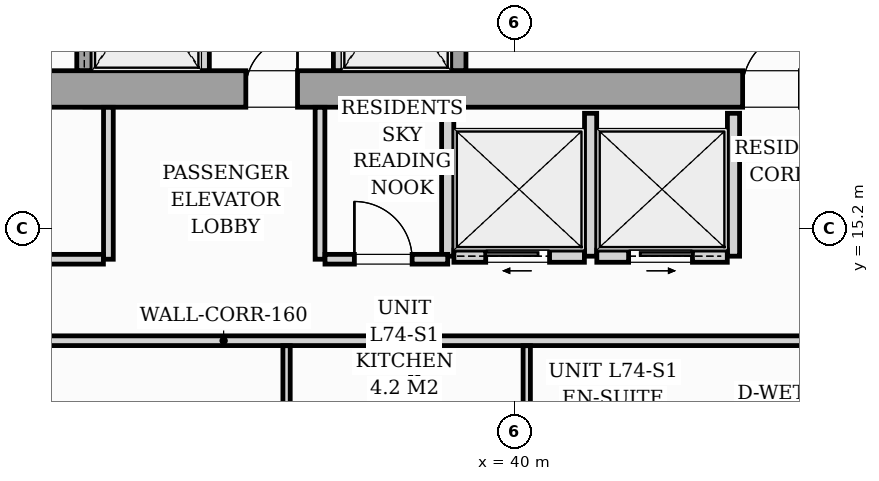
"""IFC4 building model, lengths in metres.
Left out: names, types, materials, properties, quantities, classifications, styles, units other than length and angle.
Written with IfcOpenShell. Run it as: python <this file> out.ifc"""

import sys

from ifc_helpers import new_model, si_unit, direction, frame, frame_2d, origin, origin_2d, place, context, subcontext, project, spatial, rectangle, i_section, extrude, source, transform, mapped, element, fill, save


model = new_model("IFC4")
c1 = context("Model", 3, precision=1e-05, world=origin(), true_north=direction((0.0, 1.0)))
c2 = subcontext(c1, "Body", "Model", "MODEL_VIEW")
j1 = project(units=[si_unit("LENGTHUNIT", "METRE"), si_unit("PLANEANGLEUNIT", "RADIAN")], contexts=[c1])
p1 = place(None, origin())
s1 = spatial("IfcSite", under=j1, at=p1, CompositionType="ELEMENT")
p2 = place(p1, origin())
s2 = spatial("IfcBuilding", under=s1, at=p2, CompositionType="ELEMENT")
p3 = place(p2, frame((0.0, 0.0, 256.2)))
s3 = spatial("IfcBuildingStorey", under=s2, at=p3, CompositionType="ELEMENT", Elevation=256.2)
m1 = source(origin(), c2, "Body", "SweptSolid", [
    extrude(i_section(OverallWidth=0.409, OverallDepth=0.425, WebThickness=0.033, FlangeThickness=0.052, FilletRadius=0.018, at=origin_2d()), origin(), (0.0, 0.0, 1.0), 3.296),
])
for number, where, z_axis, x_axis in (
    (1, (33.12, 17.4, 0.002), (0.0, 0.0, 1.0), (1.0, 0.0, 0.0)),
    (2, (38.88, 17.4, 0.002), (0.0, 0.0, 1.0), (1.0, 0.0, 0.0)),
):
    element("IfcColumn", number, at=place(p3, frame(where, z_axis=z_axis, x_axis=x_axis)), inside=s3, PredefinedType="PILASTER", context=c2, shape_type="MappedRepresentation", body=[
        mapped(m1, transform((0.0, 0.0, 0.0), scale=1.0)),
    ])
p4 = place(p3, frame((26.2, 17.5, 0.0), z_axis=(0.0, 0.0, 1.0), x_axis=(1.0, 0.0, 0.0)))
e3 = element("IfcWall", 3, at=p4, inside=s3, PredefinedType="SHEAR", context=c2, shape_type="SweptSolid", body=[
    extrude(rectangle(XDim=19.6, YDim=0.6, at=frame_2d((9.8, 0.0))), origin(), (0.0, 0.0, 1.0), 3.3),
])
p5 = place(p4, frame((0.95, 0.0, 0.0)))
e4 = element("IfcOpeningElement", 4, at=p5, cuts=e3, PredefinedType="OPENING", context=c2, shape_type="SweptSolid", body=[
    extrude(rectangle(XDim=0.95, YDim=2.06, at=frame_2d((0.475, 1.03))), frame((0.0, 0.31, 0.0), z_axis=(0.0, -1.0, 0.0), x_axis=(1.0, 0.0, 0.0)), (0.0, 0.0, 1.0), 0.62),
])
p6 = place(p4, frame((9.38, 0.0, 0.0)))
e5 = element("IfcOpeningElement", 5, at=p6, cuts=e3, PredefinedType="OPENING", context=c2, shape_type="SweptSolid", body=[
    extrude(rectangle(XDim=0.85, YDim=2.0, at=frame_2d((0.425, 1.0))), frame((0.0, 0.31, 0.0), z_axis=(0.0, -1.0, 0.0), x_axis=(1.0, 0.0, 0.0)), (0.0, 0.0, 1.0), 0.62),
])
p7 = place(p4, frame((17.55, 0.0, 0.0)))
e6 = element("IfcOpeningElement", 6, at=p7, cuts=e3, PredefinedType="OPENING", context=c2, shape_type="SweptSolid", body=[
    extrude(rectangle(XDim=0.95, YDim=2.06, at=frame_2d((0.475, 1.03))), frame((0.0, 0.31, 0.0), z_axis=(0.0, -1.0, 0.0), x_axis=(1.0, 0.0, 0.0)), (0.0, 0.0, 1.0), 0.62),
])
p8 = place(p3, frame((32.925, 17.802, 0.0), z_axis=(0.0, 0.0, 1.0), x_axis=(0.0, 1.0, 0.0)))
e7 = element("IfcWall", 7, at=p8, inside=s3, PredefinedType="SOLIDWALL", context=c2, shape_type="SweptSolid", body=[
    extrude(rectangle(XDim=2.646, YDim=0.25, at=frame_2d((1.323, 0.0))), origin(), (0.0, 0.0, 1.0), 3.3),
])
p9 = place(p8, frame((0.548, 0.0, 0.0)))
e8 = element("IfcOpeningElement", 8, at=p9, cuts=e7, PredefinedType="OPENING", context=c2, shape_type="SweptSolid", body=[
    extrude(rectangle(XDim=1.1, YDim=2.08, at=frame_2d((0.55, 1.04))), frame((0.0, 0.135, 0.0), z_axis=(0.0, -1.0, 0.0), x_axis=(1.0, 0.0, 0.0)), (0.0, 0.0, 1.0), 0.27),
])
for number, where, z_axis, x_axis in (
    (9, (34.9, 17.802, 0.0), (0.0, 0.0, 1.0), (0.0, 1.0, 0.0)),
    (10, (37.1, 17.802, 0.0), (0.0, 0.0, 1.0), (0.0, 1.0, 0.0)),
):
    element("IfcWall", number, at=place(p3, frame(where, z_axis=z_axis, x_axis=x_axis)), inside=s3, PredefinedType="PARTITIONING", context=c2, shape_type="SweptSolid", body=[
        extrude(rectangle(XDim=2.646, YDim=0.16, at=frame_2d((1.323, 0.0))), origin(), (0.0, 0.0, 1.0), 3.0),
    ])
p10 = place(p3, frame((39.075, 17.802, 0.0), z_axis=(0.0, 0.0, 1.0), x_axis=(0.0, 1.0, 0.0)))
e11 = element("IfcWall", 11, at=p10, inside=s3, PredefinedType="SOLIDWALL", context=c2, shape_type="SweptSolid", body=[
    extrude(rectangle(XDim=2.646, YDim=0.25, at=frame_2d((1.323, 0.0))), origin(), (0.0, 0.0, 1.0), 3.3),
])
p11 = place(p10, frame((0.548, 0.0, 0.0)))
e12 = element("IfcOpeningElement", 12, at=p11, cuts=e11, PredefinedType="OPENING", context=c2, shape_type="SweptSolid", body=[
    extrude(rectangle(XDim=1.1, YDim=2.08, at=frame_2d((0.55, 1.04))), frame((0.0, 0.135, 0.0), z_axis=(0.0, -1.0, 0.0), x_axis=(1.0, 0.0, 0.0)), (0.0, 0.0, 1.0), 0.27),
])
for number, where, z_axis, x_axis in (
    (13, (38.9, 14.75, 0.0), (0.0, 0.0, 1.0), (0.0, 1.0, 0.0)),
    (14, (41.25, 14.75, 0.0), (0.0, 0.0, 1.0), (0.0, 1.0, 0.0)),
    (15, (43.6, 14.75, 0.0), (0.0, 0.0, 1.0), (0.0, 1.0, 0.0)),
):
    element("IfcWall", number, at=place(p3, frame(where, z_axis=z_axis, x_axis=x_axis)), inside=s3, PredefinedType="PARTITIONING", context=c2, shape_type="SweptSolid", body=[
        extrude(rectangle(XDim=2.35, YDim=0.2, at=frame_2d((1.175, 0.0))), origin(), (0.0, 0.0, 1.0), 3.0),
    ])
p12 = place(p3, frame((39.002, 14.75, 0.0), z_axis=(0.0, 0.0, 1.0), x_axis=(1.0, 0.0, 0.0)))
e16 = element("IfcWall", 16, at=p12, inside=s3, PredefinedType="PARTITIONING", context=c2, shape_type="SweptSolid", body=[
    extrude(rectangle(XDim=2.146, YDim=0.2, at=frame_2d((1.073, 0.0))), origin(), (0.0, 0.0, 1.0), 3.0),
])
p13 = place(p12, frame((0.523, 0.0, 0.0)))
e17 = element("IfcOpeningElement", 17, at=p13, cuts=e16, PredefinedType="OPENING", context=c2, shape_type="SweptSolid", body=[
    extrude(rectangle(XDim=1.05, YDim=2.08, at=frame_2d((0.525, 1.04))), frame((0.0, 0.11, 0.0), z_axis=(0.0, -1.0, 0.0), x_axis=(1.0, 0.0, 0.0)), (0.0, 0.0, 1.0), 0.22),
])
p14 = place(p3, frame((41.352, 14.75, 0.0), z_axis=(0.0, 0.0, 1.0), x_axis=(1.0, 0.0, 0.0)))
e18 = element("IfcWall", 18, at=p14, inside=s3, PredefinedType="PARTITIONING", context=c2, shape_type="SweptSolid", body=[
    extrude(rectangle(XDim=2.146, YDim=0.2, at=frame_2d((1.073, 0.0))), origin(), (0.0, 0.0, 1.0), 3.0),
])
p15 = place(p14, frame((0.523, 0.0, 0.0)))
e19 = element("IfcOpeningElement", 19, at=p15, cuts=e18, PredefinedType="OPENING", context=c2, shape_type="SweptSolid", body=[
    extrude(rectangle(XDim=1.05, YDim=2.08, at=frame_2d((0.525, 1.04))), frame((0.0, 0.11, 0.0), z_axis=(0.0, -1.0, 0.0), x_axis=(1.0, 0.0, 0.0)), (0.0, 0.0, 1.0), 0.22),
])
p16 = place(p3, frame((24.55, 13.36, 0.0), z_axis=(0.0, 0.0, 1.0), x_axis=(1.0, 0.0, 0.0)))
e20 = element("IfcWall", 20, at=p16, inside=s3, PredefinedType="PARTITIONING", context=c2, shape_type="SweptSolid", body=[
    extrude(rectangle(XDim=21.33, YDim=0.16, at=frame_2d((10.665, 0.0))), origin(), (0.0, 0.0, 1.0), 2.51),
])
p17 = place(p16, frame((5.415, 0.0, 0.0)))
e21 = element("IfcOpeningElement", 21, at=p17, cuts=e20, PredefinedType="OPENING", context=c2, shape_type="SweptSolid", body=[
    extrude(rectangle(XDim=0.95, YDim=2.06, at=frame_2d((0.475, 1.03))), frame((0.0, 0.09, 0.0), z_axis=(0.0, -1.0, 0.0), x_axis=(1.0, 0.0, 0.0)), (0.0, 0.0, 1.0), 0.18),
])
p18 = place(p3, frame((40.2, 8.653, 0.0), z_axis=(0.0, 0.0, 1.0), x_axis=(0.0, 1.0, 0.0)))
e22 = element("IfcWall", 22, at=p18, inside=s3, PredefinedType="PARTITIONING", context=c2, shape_type="SweptSolid", body=[
    extrude(rectangle(XDim=4.625, YDim=0.12, at=frame_2d((2.312, 0.0))), origin(), (0.0, 0.0, 1.0), 3.0),
])
p19 = place(p18, frame((1.832, 0.0, 0.0)))
e23 = element("IfcOpeningElement", 23, at=p19, cuts=e22, PredefinedType="OPENING", context=c2, shape_type="SweptSolid", body=[
    extrude(rectangle(XDim=0.55, YDim=2.0, at=frame_2d((0.275, 1.0))), frame((0.0, 0.07, 0.0), z_axis=(0.0, -1.0, 0.0), x_axis=(1.0, 0.0, 0.0)), (0.0, 0.0, 1.0), 0.14),
])
for number, where, z_axis, x_axis in (
    (24, (38.35, 11.172, 0.0), (0.0, 0.0, 1.0), (0.0, 1.0, 0.0)),
    (25, (36.25, 11.172, 0.0), (0.0, 0.0, 1.0), (0.0, 1.0, 0.0)),
):
    element("IfcWall", number, at=place(p3, frame(where, z_axis=z_axis, x_axis=x_axis)), inside=s3, PredefinedType="PARTITIONING", context=c2, shape_type="SweptSolid", body=[
        extrude(rectangle(XDim=2.106, YDim=0.12, at=frame_2d((1.053, 0.0))), origin(), (0.0, 0.0, 1.0), 3.0),
    ])
p20 = place(p3, frame((33.32, 14.7, 0.0), z_axis=(0.0, 0.0, 1.0), x_axis=(0.0, 1.0, 0.0)))
e26 = element("IfcWall", 26, at=p20, inside=s3, PredefinedType="PARTITIONING", context=c2, shape_type="SweptSolid", body=[
    extrude(rectangle(XDim=2.498, YDim=0.16, at=frame_2d((1.249, 0.0))), origin(), (0.0, 0.0, 1.0), 3.0),
])
p21 = place(p3, frame((28.442, 14.7, 0.0), z_axis=(0.0, 0.0, 1.0), x_axis=(1.0, 0.0, 0.0)))
e27 = element("IfcWall", 27, at=p21, inside=s3, PredefinedType="PARTITIONING", context=c2, shape_type="SweptSolid", body=[
    extrude(rectangle(XDim=4.796, YDim=0.16, at=frame_2d((2.398, 0.0))), origin(), (0.0, 0.0, 1.0), 2.51),
])
p22 = place(p21, frame((1.923, 0.0, 0.0)))
e28 = element("IfcOpeningElement", 28, at=p22, cuts=e27, PredefinedType="OPENING", context=c2, shape_type="SweptSolid", body=[
    extrude(rectangle(XDim=0.95, YDim=2.06, at=frame_2d((0.475, 1.03))), frame((0.0, 0.09, 0.0), z_axis=(0.0, -1.0, 0.0), x_axis=(1.0, 0.0, 0.0)), (0.0, 0.0, 1.0), 0.18),
])
p23 = place(p3, frame((36.8, 14.7, 0.0), z_axis=(0.0, 0.0, 1.0), x_axis=(0.0, 1.0, 0.0)))
e29 = element("IfcWall", 29, at=p23, inside=s3, PredefinedType="PARTITIONING", context=c2, shape_type="SweptSolid", body=[
    extrude(rectangle(XDim=2.498, YDim=0.16, at=frame_2d((1.249, 0.0))), origin(), (0.0, 0.0, 1.0), 3.0),
])
p24 = place(p3, frame((36.882, 14.7, 0.0), z_axis=(0.0, 0.0, 1.0), x_axis=(1.0, 0.0, 0.0)))
e30 = element("IfcWall", 30, at=p24, inside=s3, PredefinedType="PARTITIONING", context=c2, shape_type="SweptSolid", body=[
    extrude(rectangle(XDim=2.018, YDim=0.16, at=frame_2d((1.009, 0.0))), origin(), (0.0, 0.0, 1.0), 3.0),
])
p25 = place(p24, frame((0.483, 0.0, 0.0)))
e31 = element("IfcOpeningElement", 31, at=p25, cuts=e30, PredefinedType="OPENING", context=c2, shape_type="SweptSolid", body=[
    extrude(rectangle(XDim=0.95, YDim=2.06, at=frame_2d((0.475, 1.03))), frame((0.0, 0.09, 0.0), z_axis=(0.0, -1.0, 0.0), x_axis=(1.0, 0.0, 0.0)), (0.0, 0.0, 1.0), 0.18),
])
m2 = source(origin(), c2, "Body", "SweptSolid", [
    extrude(rectangle(XDim=0.85, YDim=2.0, at=frame_2d((0.425, 1.0))), frame((0.0, 0.025, 0.0), z_axis=(0.0, -1.0, 0.0), x_axis=(1.0, 0.0, 0.0)), (0.0, 0.0, 1.0), 0.05),
])
p26 = place(p6, origin())
e32 = element("IfcDoor", 32, at=p26, inside=s3, OperationType="SINGLE_SWING_RIGHT", PredefinedType="DOOR", context=c2, shape_type="MappedRepresentation", body=[
    mapped(m2, transform((0.0, 0.0, 0.0), scale=1.0)),
])
fill(e5, e32)
m3 = source(origin(), c2, "Body", "SweptSolid", [
    extrude(rectangle(XDim=0.95, YDim=2.06, at=frame_2d((0.475, 1.03))), frame((0.0, 0.025, 0.0), z_axis=(0.0, -1.0, 0.0), x_axis=(1.0, 0.0, 0.0)), (0.0, 0.0, 1.0), 0.05),
])
p27 = place(p7, origin())
e33 = element("IfcDoor", 33, at=p27, inside=s3, OperationType="SINGLE_SWING_RIGHT", PredefinedType="DOOR", context=c2, shape_type="MappedRepresentation", body=[
    mapped(m3, transform((0.0, 0.0, 0.0), scale=1.0)),
])
fill(e6, e33)
m4 = source(origin(), c2, "Body", "SweptSolid", [
    extrude(rectangle(XDim=1.05, YDim=2.08, at=frame_2d((0.525, 1.04))), frame((0.0, 0.025, 0.0), z_axis=(0.0, -1.0, 0.0), x_axis=(1.0, 0.0, 0.0)), (0.0, 0.0, 1.0), 0.05),
])
p28 = place(p13, origin())
e34 = element("IfcDoor", 34, at=p28, inside=s3, OperationType="SLIDING_TO_LEFT", PredefinedType="DOOR", context=c2, shape_type="MappedRepresentation", body=[
    mapped(m4, transform((0.0, 0.0, 0.0), scale=1.0)),
])
fill(e17, e34)
p29 = place(p15, origin())
e35 = element("IfcDoor", 35, at=p29, inside=s3, OperationType="SLIDING_TO_RIGHT", PredefinedType="DOOR", context=c2, shape_type="MappedRepresentation", body=[
    mapped(m4, transform((0.0, 0.0, 0.0), scale=1.0)),
])
fill(e19, e35)
m5 = source(origin(), c2, "Body", "SweptSolid", [
    extrude(rectangle(XDim=0.95, YDim=2.06, at=frame_2d((0.475, 1.03))), frame((0.0, 0.025, 0.0), z_axis=(0.0, -1.0, 0.0), x_axis=(1.0, 0.0, 0.0)), (0.0, 0.0, 1.0), 0.05),
])
p30 = place(p25, origin())
e36 = element("IfcDoor", 36, at=p30, inside=s3, OperationType="SINGLE_SWING_LEFT", PredefinedType="DOOR", context=c2, shape_type="MappedRepresentation", body=[
    mapped(m5, transform((0.0, 0.0, 0.0), scale=1.0)),
])
fill(e31, e36)
save(model, sys.argv[1])
